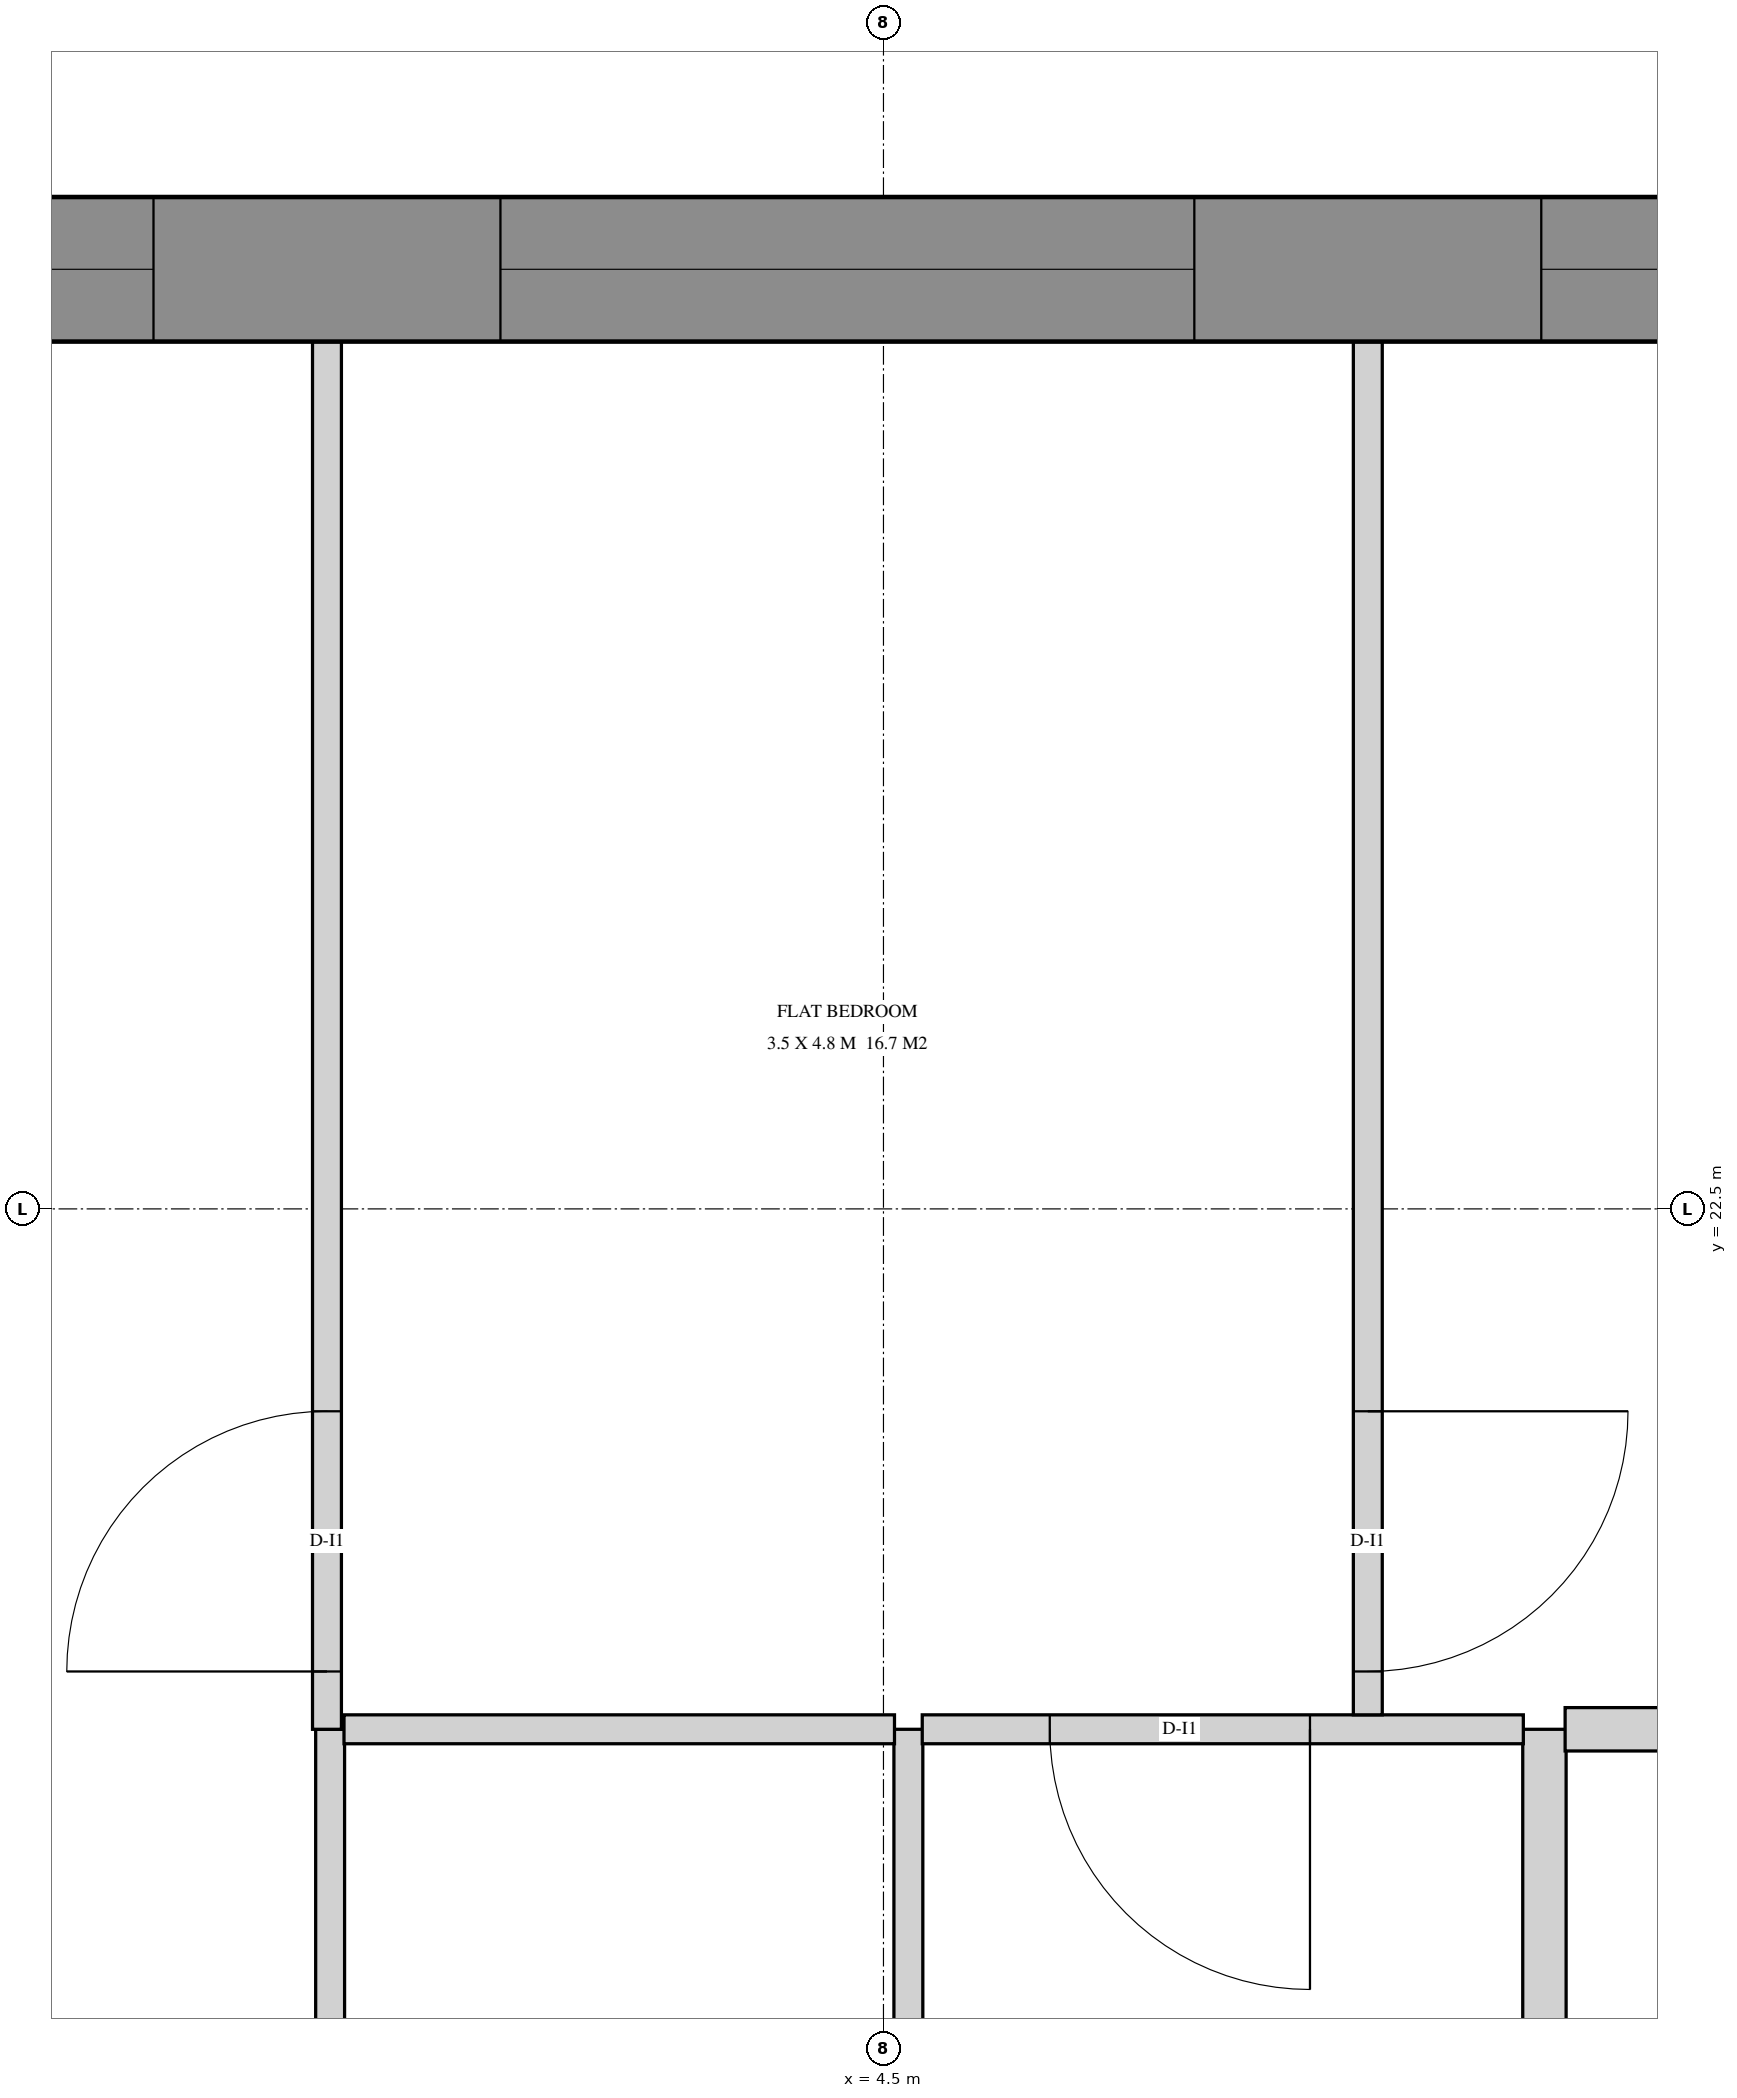
"""IFC4 building model, lengths in metres.
Left out: names, types, materials, properties, quantities, classifications, styles, units other than length and angle.
Written with IfcOpenShell. Run it as: python <this file> out.ifc"""

import sys

from ifc_helpers import new_model, si_unit, direction, frame, frame_2d, origin, place, context, subcontext, project, spatial, polyline, rectangle, outline, extrude, element, fill, save


model = new_model("IFC4")
c1 = context("Model", 3, precision=1e-05, world=origin(), true_north=direction((0.0, 1.0)))
c2 = subcontext(c1, "Body", "Model", "MODEL_VIEW")
j1 = project(units=[si_unit("LENGTHUNIT", "METRE"), si_unit("PLANEANGLEUNIT", "RADIAN")], contexts=[c1])
p1 = place(None, origin())
s1 = spatial("IfcSite", under=j1, at=p1, CompositionType="ELEMENT")
p2 = place(p1, origin())
s2 = spatial("IfcBuilding", under=s1, at=p2, CompositionType="ELEMENT")
p3 = place(p2, frame((0.0, 0.0, 256.2)))
s3 = spatial("IfcBuildingStorey", under=s2, at=p3, CompositionType="ELEMENT", Elevation=256.2)
p4 = place(p3, frame((11.698, 25.75, 0.0), z_axis=(0.0, 0.0, 1.0), x_axis=(-1.0, 0.0, 0.0)))
e1 = element("IfcWall", 1, at=p4, inside=s3, PredefinedType="SOLIDWALL", context=c2, shape_type="SweptSolid", body=[
    extrude(outline(polyline([(-0.021, -0.25), (25.468, -0.25), (25.421, 0.25), (0.021, 0.25), (-0.021, -0.25)])), origin(), (0.0, 0.0, 1.0), 3.75),
])
p5 = place(p4, frame((2.522, 0.0, 0.6)))
e2 = element("IfcOpeningElement", 2, at=p5, cuts=e1, PredefinedType="OPENING", context=c2, shape_type="SweptSolid", body=[
    extrude(rectangle(XDim=2.4, YDim=2.7, at=frame_2d((1.2, 1.35))), frame((0.0, 0.26, 0.0), z_axis=(0.0, -1.0, 0.0), x_axis=(1.0, 0.0, 0.0)), (0.0, 0.0, 1.0), 0.52),
])
p6 = place(p4, frame((6.122, 0.0, 0.6)))
e3 = element("IfcOpeningElement", 3, at=p6, cuts=e1, PredefinedType="OPENING", context=c2, shape_type="SweptSolid", body=[
    extrude(rectangle(XDim=2.4, YDim=2.7, at=frame_2d((1.2, 1.35))), frame((0.0, 0.26, 0.0), z_axis=(0.0, -1.0, 0.0), x_axis=(1.0, 0.0, 0.0)), (0.0, 0.0, 1.0), 0.52),
])
p7 = place(p4, frame((9.722, 0.0, 0.6)))
e4 = element("IfcOpeningElement", 4, at=p7, cuts=e1, PredefinedType="OPENING", context=c2, shape_type="SweptSolid", body=[
    extrude(rectangle(XDim=2.4, YDim=2.7, at=frame_2d((1.2, 1.35))), frame((0.0, 0.26, 0.0), z_axis=(0.0, -1.0, 0.0), x_axis=(1.0, 0.0, 0.0)), (0.0, 0.0, 1.0), 0.52),
])
p8 = place(p4, frame((13.323, 0.0, 0.6)))
e5 = element("IfcOpeningElement", 5, at=p8, cuts=e1, PredefinedType="OPENING", context=c2, shape_type="SweptSolid", body=[
    extrude(rectangle(XDim=2.4, YDim=2.7, at=frame_2d((1.2, 1.35))), frame((0.0, 0.26, 0.0), z_axis=(0.0, -1.0, 0.0), x_axis=(1.0, 0.0, 0.0)), (0.0, 0.0, 1.0), 0.52),
])
p9 = place(p4, frame((16.922, 0.0, 0.6)))
e6 = element("IfcOpeningElement", 6, at=p9, cuts=e1, PredefinedType="OPENING", context=c2, shape_type="SweptSolid", body=[
    extrude(rectangle(XDim=2.4, YDim=2.7, at=frame_2d((1.2, 1.35))), frame((0.0, 0.26, 0.0), z_axis=(0.0, -1.0, 0.0), x_axis=(1.0, 0.0, 0.0)), (0.0, 0.0, 1.0), 0.52),
])
p10 = place(p4, frame((20.522, 0.0, 0.6)))
e7 = element("IfcOpeningElement", 7, at=p10, cuts=e1, PredefinedType="OPENING", context=c2, shape_type="SweptSolid", body=[
    extrude(rectangle(XDim=2.4, YDim=2.7, at=frame_2d((1.2, 1.35))), frame((0.0, 0.26, 0.0), z_axis=(0.0, -1.0, 0.0), x_axis=(1.0, 0.0, 0.0)), (0.0, 0.0, 1.0), 0.52),
])
p11 = place(p3, frame((6.351, 11.0, 0.0), z_axis=(0.0, 0.0, 1.0), x_axis=(0.499998894578, 0.866026041999, 0.0)))
e8 = element("IfcWall", 8, at=p11, inside=s3, PredefinedType="SHEAR", context=c2, shape_type="SweptSolid", body=[
    extrude(rectangle(XDim=15.544, YDim=0.4, at=frame_2d((7.772, 0.0))), origin(), (0.0, 0.0, 1.0), 3.75),
])
p12 = place(p11, frame((6.872, 0.0, 0.0)))
e9 = element("IfcOpeningElement", 9, at=p12, cuts=e8, PredefinedType="OPENING", context=c2, shape_type="SweptSolid", body=[
    extrude(rectangle(XDim=1.8, YDim=2.4, at=frame_2d((0.9, 1.2))), frame((0.0, 0.21, 0.0), z_axis=(0.0, -1.0, 0.0), x_axis=(1.0, 0.0, 0.0)), (0.0, 0.0, 1.0), 0.42),
])
p13 = place(p3, frame((6.786, 20.7, 0.0), z_axis=(0.0, 0.0, 1.0), x_axis=(0.0, -1.0, 0.0)))
e10 = element("IfcWall", 10, at=p13, inside=s3, PredefinedType="PARTITIONING", context=c2, shape_type="SweptSolid", body=[
    extrude(rectangle(XDim=3.4, YDim=0.15, at=frame_2d((1.7, 0.0))), origin(), (0.0, 0.0, 1.0), 2.823),
])
p14 = place(p3, frame((9.774, 20.7, 0.0), z_axis=(0.0, 0.0, 1.0), x_axis=(-1.0, 0.0, 0.0)))
e11 = element("IfcWall", 11, at=p14, inside=s3, PredefinedType="PARTITIONING", context=c2, shape_type="SweptSolid", body=[
    extrude(rectangle(XDim=2.916, YDim=0.15, at=frame_2d((1.458, 0.0))), origin(), (0.0, 0.0, 1.0), 2.823),
])
p15 = place(p3, frame((2.586, 17.375, 0.0), z_axis=(0.0, 0.0, 1.0), x_axis=(0.0, 1.0, 0.0)))
e12 = element("IfcWall", 12, at=p15, inside=s3, PredefinedType="PARTITIONING", context=c2, shape_type="SweptSolid", body=[
    extrude(rectangle(XDim=3.325, YDim=0.1, at=frame_2d((1.663, 0.0))), origin(), (0.0, 0.0, 1.0), 2.823),
])
p16 = place(p3, frame((2.575, 20.7, 0.0), z_axis=(0.0, 0.0, 1.0), x_axis=(0.0, 1.0, 0.0)))
e13 = element("IfcWall", 13, at=p16, inside=s3, PredefinedType="PARTITIONING", context=c2, shape_type="SweptSolid", body=[
    extrude(rectangle(XDim=4.8, YDim=0.1, at=frame_2d((2.4, 0.0))), origin(), (0.0, 0.0, 1.0), 2.823),
])
p17 = place(p16, frame((0.2, 0.0, 0.0)))
e14 = element("IfcOpeningElement", 14, at=p17, cuts=e13, PredefinedType="OPENING", context=c2, shape_type="SweptSolid", body=[
    extrude(rectangle(XDim=0.9, YDim=2.1, at=frame_2d((0.45, 1.05))), frame((0.0, 0.06, 0.0), z_axis=(0.0, -1.0, 0.0), x_axis=(1.0, 0.0, 0.0)), (0.0, 0.0, 1.0), 0.12),
])
p18 = place(p3, frame((4.586, 20.7, 0.0), z_axis=(0.0, 0.0, 1.0), x_axis=(0.0, -1.0, 0.0)))
e15 = element("IfcWall", 15, at=p18, inside=s3, PredefinedType="PARTITIONING", context=c2, shape_type="SweptSolid", body=[
    extrude(rectangle(XDim=3.325, YDim=0.1, at=frame_2d((1.663, 0.0))), origin(), (0.0, 0.0, 1.0), 2.823),
])
p19 = place(p18, frame((1.3, 0.0, 0.0)))
e16 = element("IfcOpeningElement", 16, at=p19, cuts=e15, PredefinedType="OPENING", context=c2, shape_type="SweptSolid", body=[
    extrude(rectangle(XDim=0.8, YDim=2.1, at=frame_2d((0.4, 1.05))), frame((0.0, 0.06, 0.0), z_axis=(0.0, -1.0, 0.0), x_axis=(1.0, 0.0, 0.0)), (0.0, 0.0, 1.0), 0.12),
])
p20 = place(p3, frame((6.713, 20.7, 0.0), z_axis=(0.0, 0.0, 1.0), x_axis=(-1.0, 0.0, 0.0)))
e17 = element("IfcWall", 17, at=p20, inside=s3, PredefinedType="PARTITIONING", context=c2, shape_type="SweptSolid", body=[
    extrude(rectangle(XDim=2.079, YDim=0.1, at=frame_2d((1.04, 0.0))), origin(), (0.0, 0.0, 1.0), 2.823),
])
p21 = place(p20, frame((0.738, 0.0, 0.0)))
e18 = element("IfcOpeningElement", 18, at=p21, cuts=e17, PredefinedType="OPENING", context=c2, shape_type="SweptSolid", body=[
    extrude(rectangle(XDim=0.9, YDim=2.1, at=frame_2d((0.45, 1.05))), frame((0.0, 0.06, 0.0), z_axis=(0.0, -1.0, 0.0), x_axis=(1.0, 0.0, 0.0)), (0.0, 0.0, 1.0), 0.12),
])
p22 = place(p3, frame((4.538, 20.7, 0.0), z_axis=(0.0, 0.0, 1.0), x_axis=(-1.0, 0.0, 0.0)))
e19 = element("IfcWall", 19, at=p22, inside=s3, PredefinedType="PARTITIONING", context=c2, shape_type="SweptSolid", body=[
    extrude(rectangle(XDim=1.904, YDim=0.1, at=frame_2d((0.952, 0.0))), origin(), (0.0, 0.0, 1.0), 2.823),
])
p23 = place(p3, frame((6.175, 25.5, 0.0), z_axis=(0.0, 0.0, 1.0), x_axis=(0.0, -1.0, 0.0)))
e20 = element("IfcWall", 20, at=p23, inside=s3, PredefinedType="PARTITIONING", context=c2, shape_type="SweptSolid", body=[
    extrude(rectangle(XDim=4.75, YDim=0.1, at=frame_2d((2.375, 0.0))), origin(), (0.0, 0.0, 1.0), 2.823),
])
p24 = place(p23, frame((3.7, 0.0, 0.0)))
e21 = element("IfcOpeningElement", 21, at=p24, cuts=e20, PredefinedType="OPENING", context=c2, shape_type="SweptSolid", body=[
    extrude(rectangle(XDim=0.9, YDim=2.1, at=frame_2d((0.45, 1.05))), frame((0.0, 0.06, 0.0), z_axis=(0.0, -1.0, 0.0), x_axis=(1.0, 0.0, 0.0)), (0.0, 0.0, 1.0), 0.12),
])
p25 = place(p5, frame((0.0, 0.18, 0.0)))
e22 = element("IfcWindow", 22, at=p25, inside=s3, PartitioningType="DOUBLE_PANEL_VERTICAL", PredefinedType="WINDOW", context=c2, shape_type="SweptSolid", body=[
    extrude(rectangle(XDim=2.4, YDim=2.7, at=frame_2d((1.2, 1.35))), frame((0.0, 0.03, 0.0), z_axis=(0.0, -1.0, 0.0), x_axis=(1.0, 0.0, 0.0)), (0.0, 0.0, 1.0), 0.06),
])
fill(e2, e22)
p26 = place(p6, frame((0.0, 0.18, 0.0)))
e23 = element("IfcWindow", 23, at=p26, inside=s3, PartitioningType="DOUBLE_PANEL_VERTICAL", PredefinedType="WINDOW", context=c2, shape_type="SweptSolid", body=[
    extrude(rectangle(XDim=2.4, YDim=2.7, at=frame_2d((1.2, 1.35))), frame((0.0, 0.03, 0.0), z_axis=(0.0, -1.0, 0.0), x_axis=(1.0, 0.0, 0.0)), (0.0, 0.0, 1.0), 0.06),
])
fill(e3, e23)
p27 = place(p7, frame((0.0, 0.18, 0.0)))
e24 = element("IfcWindow", 24, at=p27, inside=s3, PartitioningType="DOUBLE_PANEL_VERTICAL", PredefinedType="WINDOW", context=c2, shape_type="SweptSolid", body=[
    extrude(rectangle(XDim=2.4, YDim=2.7, at=frame_2d((1.2, 1.35))), frame((0.0, 0.03, 0.0), z_axis=(0.0, -1.0, 0.0), x_axis=(1.0, 0.0, 0.0)), (0.0, 0.0, 1.0), 0.06),
])
fill(e4, e24)
p28 = place(p21, origin())
e25 = element("IfcDoor", 25, at=p28, inside=s3, OperationType="SINGLE_SWING_RIGHT", PredefinedType="DOOR", context=c2, shape_type="SweptSolid", body=[
    extrude(rectangle(XDim=0.9, YDim=2.1, at=frame_2d((0.45, 1.05))), frame((0.0, 0.025, 0.0), z_axis=(0.0, -1.0, 0.0), x_axis=(1.0, 0.0, 0.0)), (0.0, 0.0, 1.0), 0.05),
])
fill(e18, e25)
p29 = place(p24, origin())
e26 = element("IfcDoor", 26, at=p29, inside=s3, OperationType="SINGLE_SWING_RIGHT", PredefinedType="DOOR", context=c2, shape_type="SweptSolid", body=[
    extrude(rectangle(XDim=0.9, YDim=2.1, at=frame_2d((0.45, 1.05))), frame((0.0, 0.025, 0.0), z_axis=(0.0, -1.0, 0.0), x_axis=(1.0, 0.0, 0.0)), (0.0, 0.0, 1.0), 0.05),
])
fill(e21, e26)
p30 = place(p17, origin())
e27 = element("IfcDoor", 27, at=p30, inside=s3, OperationType="SINGLE_SWING_RIGHT", PredefinedType="DOOR", context=c2, shape_type="SweptSolid", body=[
    extrude(rectangle(XDim=0.9, YDim=2.1, at=frame_2d((0.45, 1.05))), frame((0.0, 0.025, 0.0), z_axis=(0.0, -1.0, 0.0), x_axis=(1.0, 0.0, 0.0)), (0.0, 0.0, 1.0), 0.05),
])
fill(e14, e27)
save(model, sys.argv[1])
